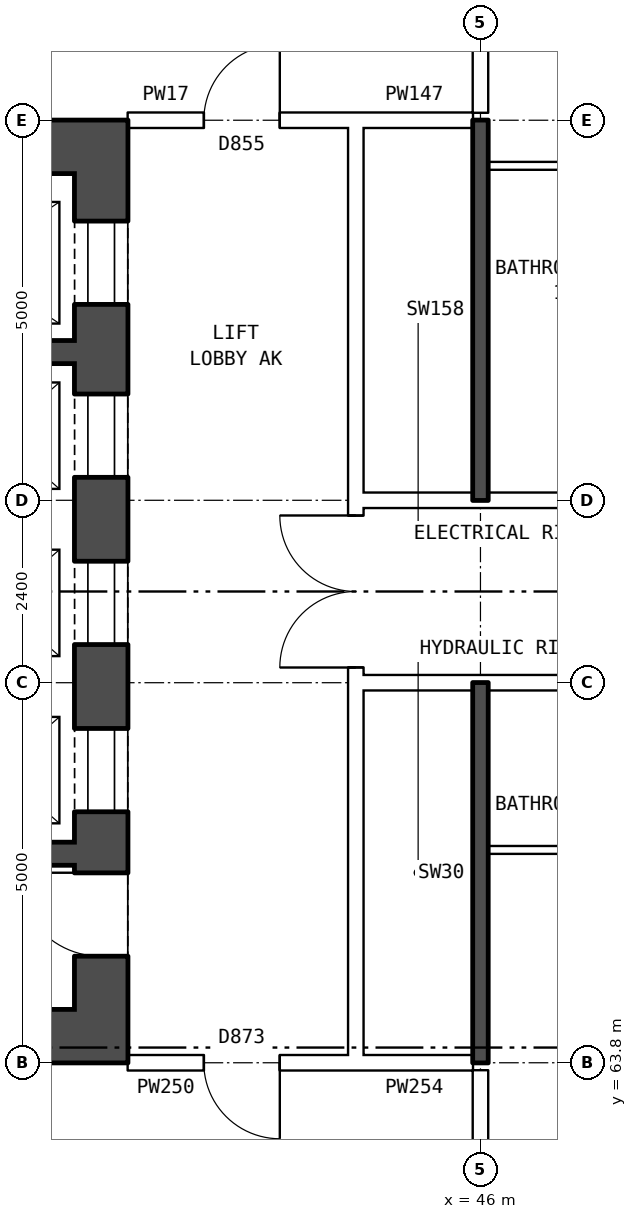
"""IFC4 building model, lengths in metres.
Left out: names, types, materials, properties, quantities, classifications, styles, units other than length and angle.
Written with IfcOpenShell. Run it as: python <this file> out.ifc"""

import sys

from ifc_helpers import new_model, si_unit, direction, frame, frame_2d, origin, place, context, subcontext, project, spatial, rectangle, extrude, element, fill, save


model = new_model("IFC4")
c1 = context("Model", 3, precision=1e-05, world=origin(), true_north=direction((0.0, 1.0)))
c2 = subcontext(c1, "Body", "Model", "MODEL_VIEW")
j1 = project(units=[si_unit("LENGTHUNIT", "METRE"), si_unit("PLANEANGLEUNIT", "RADIAN")], contexts=[c1])
p1 = place(None, origin())
s1 = spatial("IfcSite", under=j1, at=p1, CompositionType="ELEMENT")
p2 = place(p1, origin())
s2 = spatial("IfcBuilding", under=s1, at=p2, CompositionType="ELEMENT")
p3 = place(p2, frame((0.0, 0.0, 71.6)))
s3 = spatial("IfcBuildingStorey", under=s2, at=p3, CompositionType="ELEMENT", Elevation=71.6)
p4 = place(p3, frame((41.01, 75.5, 0.0), z_axis=(0.0, 0.0, 1.0), x_axis=(0.0, -1.0, 0.0)))
e1 = element("IfcWall", 1, at=p4, inside=s3, PredefinedType="SHEAR", context=c2, shape_type="SweptSolid", body=[
    extrude(rectangle(XDim=11.0, YDim=0.7, at=frame_2d((5.5, 0.0))), origin(), (0.0, 0.0, 1.0), 2.85),
])
p5 = place(p4, frame((0.625, 0.0, 0.0)))
e2 = element("IfcOpeningElement", 2, at=p5, cuts=e1, PredefinedType="OPENING", context=c2, shape_type="SweptSolid", body=[
    extrude(rectangle(XDim=1.1, YDim=2.1, at=frame_2d((0.55, 1.05))), frame((0.0, 0.36, 0.0), z_axis=(0.0, -1.0, 0.0), x_axis=(1.0, 0.0, 0.0)), (0.0, 0.0, 1.0), 0.72),
])
p6 = place(p4, frame((2.9, 0.0, 0.0)))
e3 = element("IfcOpeningElement", 3, at=p6, cuts=e1, PredefinedType="OPENING", context=c2, shape_type="SweptSolid", body=[
    extrude(rectangle(XDim=1.1, YDim=2.1, at=frame_2d((0.55, 1.05))), frame((0.0, 0.36, 0.0), z_axis=(0.0, -1.0, 0.0), x_axis=(1.0, 0.0, 0.0)), (0.0, 0.0, 1.0), 0.72),
])
p7 = place(p4, frame((5.1, 0.0, 0.0)))
e4 = element("IfcOpeningElement", 4, at=p7, cuts=e1, PredefinedType="OPENING", context=c2, shape_type="SweptSolid", body=[
    extrude(rectangle(XDim=1.1, YDim=2.1, at=frame_2d((0.55, 1.05))), frame((0.0, 0.36, 0.0), z_axis=(0.0, -1.0, 0.0), x_axis=(1.0, 0.0, 0.0)), (0.0, 0.0, 1.0), 0.72),
])
p8 = place(p4, frame((7.3, 0.0, 0.0)))
e5 = element("IfcOpeningElement", 5, at=p8, cuts=e1, PredefinedType="OPENING", context=c2, shape_type="SweptSolid", body=[
    extrude(rectangle(XDim=1.1, YDim=2.1, at=frame_2d((0.55, 1.05))), frame((0.0, 0.36, 0.0), z_axis=(0.0, -1.0, 0.0), x_axis=(1.0, 0.0, 0.0)), (0.0, 0.0, 1.0), 0.72),
])
p9 = place(p4, frame((9.2, 0.0, 0.0)))
e6 = element("IfcOpeningElement", 6, at=p9, cuts=e1, PredefinedType="OPENING", context=c2, shape_type="SweptSolid", body=[
    extrude(rectangle(XDim=1.1, YDim=2.1, at=frame_2d((0.55, 1.05))), frame((0.0, 0.36, 0.0), z_axis=(0.0, -1.0, 0.0), x_axis=(1.0, 0.0, 0.0)), (0.0, 0.0, 1.0), 0.72),
])
for number, where, z_axis, x_axis in (
    (7, (41.36, 75.85, 0.0), (0.0, 0.0, 1.0), (-1.0, 0.0, 0.0)),
    (8, (41.36, 64.15, 0.0), (0.0, 0.0, 1.0), (-1.0, 0.0, 0.0)),
):
    element("IfcWall", number, at=place(p3, frame(where, z_axis=z_axis, x_axis=x_axis)), inside=s3, PredefinedType="SHEAR", context=c2, shape_type="SweptSolid", body=[
        extrude(rectangle(XDim=9.0, YDim=0.7, at=frame_2d((4.5, 0.0))), origin(), (0.0, 0.0, 1.0), 2.85),
    ])
p10 = place(p3, frame((40.66, 73.15, 0.0), z_axis=(0.0, 0.0, 1.0), x_axis=(-1.0, 0.0, 0.0)))
e9 = element("IfcWall", 9, at=p10, inside=s3, PredefinedType="SHEAR", context=c2, shape_type="SweptSolid", body=[
    extrude(rectangle(XDim=3.32, YDim=0.3, at=frame_2d((1.66, 0.0))), origin(), (0.0, 0.0, 1.0), 2.85),
])
p11 = place(p3, frame((40.66, 66.55, 0.0), z_axis=(0.0, 0.0, 1.0), x_axis=(-1.0, 0.0, 0.0)))
e10 = element("IfcWall", 10, at=p11, inside=s3, PredefinedType="SHEAR", context=c2, shape_type="SweptSolid", body=[
    extrude(rectangle(XDim=2.2, YDim=0.3, at=frame_2d((1.1, 0.0))), origin(), (0.0, 0.0, 1.0), 2.85),
])
p12 = place(p3, frame((44.36, 63.9, 0.0), z_axis=(0.0, 0.0, 1.0), x_axis=(0.0, 1.0, 0.0)))
e11 = element("IfcWall", 11, at=p12, inside=s3, PredefinedType="PARTITIONING", context=c2, shape_type="SweptSolid", body=[
    extrude(rectangle(XDim=12.2, YDim=0.2, at=frame_2d((6.1, 0.0))), origin(), (0.0, 0.0, 1.0), 2.85),
])
p13 = place(p12, frame((5.1, 0.0, 0.0)))
e12 = element("IfcOpeningElement", 12, at=p13, cuts=e11, PredefinedType="OPENING", context=c2, shape_type="SweptSolid", body=[
    extrude(rectangle(XDim=2.0, YDim=2.1, at=frame_2d((1.0, 1.05))), frame((0.0, 0.11, 0.0), z_axis=(0.0, -1.0, 0.0), x_axis=(1.0, 0.0, 0.0)), (0.0, 0.0, 1.0), 0.22),
])
p14 = place(p3, frame((41.36, 63.8, 0.0), z_axis=(0.0, 0.0, 1.0), x_axis=(1.0, 0.0, 0.0)))
e13 = element("IfcWall", 13, at=p14, inside=s3, PredefinedType="PARTITIONING", context=c2, shape_type="SweptSolid", body=[
    extrude(rectangle(XDim=3.0, YDim=0.2, at=frame_2d((1.5, 0.0))), origin(), (0.0, 0.0, 1.0), 2.85),
])
p15 = place(p14, frame((1.0, 0.0, 0.0)))
e14 = element("IfcOpeningElement", 14, at=p15, cuts=e13, PredefinedType="OPENING", context=c2, shape_type="SweptSolid", body=[
    extrude(rectangle(XDim=1.0, YDim=2.1, at=frame_2d((0.5, 1.05))), frame((0.0, 0.11, 0.0), z_axis=(0.0, -1.0, 0.0), x_axis=(1.0, 0.0, 0.0)), (0.0, 0.0, 1.0), 0.22),
])
p16 = place(p3, frame((44.36, 63.8, 0.0), z_axis=(0.0, 0.0, 1.0), x_axis=(1.0, 0.0, 0.0)))
e15 = element("IfcWall", 15, at=p16, inside=s3, PredefinedType="PARTITIONING", context=c2, shape_type="SweptSolid", body=[
    extrude(rectangle(XDim=1.54, YDim=0.2, at=frame_2d((0.77, 0.0))), origin(), (0.0, 0.0, 1.0), 2.85),
])
p17 = place(p3, frame((46.1, 66.6, 0.0), z_axis=(0.0, 0.0, 1.0), x_axis=(1.0, 0.0, 0.0)))
e16 = element("IfcWall", 16, at=p17, inside=s3, PredefinedType="PARTITIONING", context=c2, shape_type="SweptSolid", body=[
    extrude(rectangle(XDim=2.9, YDim=0.1, at=frame_2d((1.45, 0.0))), origin(), (0.0, 0.0, 1.0), 2.85),
])
p18 = place(p3, frame((44.36, 68.8, 0.0), z_axis=(0.0, 0.0, 1.0), x_axis=(1.0, 0.0, 0.0)))
e17 = element("IfcWall", 17, at=p18, inside=s3, PredefinedType="PARTITIONING", context=c2, shape_type="SweptSolid", body=[
    extrude(rectangle(XDim=19.28, YDim=0.2, at=frame_2d((9.64, 0.0))), origin(), (0.0, 0.0, 1.0), 2.85),
])
p19 = place(p18, frame((14.64, 0.0, 0.0)))
e18 = element("IfcOpeningElement", 18, at=p19, cuts=e17, PredefinedType="OPENING", context=c2, shape_type="SweptSolid", body=[
    extrude(rectangle(XDim=1.0, YDim=2.1, at=frame_2d((0.5, 1.05))), frame((0.0, 0.11, 0.0), z_axis=(0.0, -1.0, 0.0), x_axis=(1.0, 0.0, 0.0)), (0.0, 0.0, 1.0), 0.22),
])
p20 = place(p18, frame((5.64, 0.0, 0.0)))
e19 = element("IfcOpeningElement", 19, at=p20, cuts=e17, PredefinedType="OPENING", context=c2, shape_type="SweptSolid", body=[
    extrude(rectangle(XDim=1.0, YDim=2.1, at=frame_2d((0.5, 1.05))), frame((0.0, 0.11, 0.0), z_axis=(0.0, -1.0, 0.0), x_axis=(1.0, 0.0, 0.0)), (0.0, 0.0, 1.0), 0.22),
])
p21 = place(p3, frame((44.36, 71.2, 0.0), z_axis=(0.0, 0.0, 1.0), x_axis=(1.0, 0.0, 0.0)))
e20 = element("IfcWall", 20, at=p21, inside=s3, PredefinedType="PARTITIONING", context=c2, shape_type="SweptSolid", body=[
    extrude(rectangle(XDim=19.28, YDim=0.2, at=frame_2d((9.64, 0.0))), origin(), (0.0, 0.0, 1.0), 2.85),
])
p22 = place(p21, frame((14.64, 0.0, 0.0)))
e21 = element("IfcOpeningElement", 21, at=p22, cuts=e20, PredefinedType="OPENING", context=c2, shape_type="SweptSolid", body=[
    extrude(rectangle(XDim=1.0, YDim=2.1, at=frame_2d((0.5, 1.05))), frame((0.0, 0.11, 0.0), z_axis=(0.0, -1.0, 0.0), x_axis=(1.0, 0.0, 0.0)), (0.0, 0.0, 1.0), 0.22),
])
p23 = place(p21, frame((5.64, 0.0, 0.0)))
e22 = element("IfcOpeningElement", 22, at=p23, cuts=e20, PredefinedType="OPENING", context=c2, shape_type="SweptSolid", body=[
    extrude(rectangle(XDim=1.0, YDim=2.1, at=frame_2d((0.5, 1.05))), frame((0.0, 0.11, 0.0), z_axis=(0.0, -1.0, 0.0), x_axis=(1.0, 0.0, 0.0)), (0.0, 0.0, 1.0), 0.22),
])
p24 = place(p3, frame((46.1, 75.6, 0.0), z_axis=(0.0, 0.0, 1.0), x_axis=(1.0, 0.0, 0.0)))
e23 = element("IfcWall", 23, at=p24, inside=s3, PredefinedType="PARTITIONING", context=c2, shape_type="SweptSolid", body=[
    extrude(rectangle(XDim=2.9, YDim=0.1, at=frame_2d((1.45, 0.0))), origin(), (0.0, 0.0, 1.0), 2.85),
])
p25 = place(p3, frame((41.36, 76.2, 0.0), z_axis=(0.0, 0.0, 1.0), x_axis=(1.0, 0.0, 0.0)))
e24 = element("IfcWall", 24, at=p25, inside=s3, PredefinedType="PARTITIONING", context=c2, shape_type="SweptSolid", body=[
    extrude(rectangle(XDim=3.0, YDim=0.2, at=frame_2d((1.5, 0.0))), origin(), (0.0, 0.0, 1.0), 2.85),
])
p26 = place(p25, frame((1.0, 0.0, 0.0)))
e25 = element("IfcOpeningElement", 25, at=p26, cuts=e24, PredefinedType="OPENING", context=c2, shape_type="SweptSolid", body=[
    extrude(rectangle(XDim=1.0, YDim=2.1, at=frame_2d((0.5, 1.05))), frame((0.0, 0.11, 0.0), z_axis=(0.0, -1.0, 0.0), x_axis=(1.0, 0.0, 0.0)), (0.0, 0.0, 1.0), 0.22),
])
p27 = place(p3, frame((44.36, 76.2, 0.0), z_axis=(0.0, 0.0, 1.0), x_axis=(1.0, 0.0, 0.0)))
e26 = element("IfcWall", 26, at=p27, inside=s3, PredefinedType="PARTITIONING", context=c2, shape_type="SweptSolid", body=[
    extrude(rectangle(XDim=1.54, YDim=0.2, at=frame_2d((0.77, 0.0))), origin(), (0.0, 0.0, 1.0), 2.85),
])
p28 = place(p3, frame((46.0, 61.5, 0.0), z_axis=(0.0, 0.0, 1.0), x_axis=(0.0, 1.0, 0.0)))
e27 = element("IfcWall", 27, at=p28, inside=s3, PredefinedType="PARTITIONING", context=c2, shape_type="SweptSolid", body=[
    extrude(rectangle(XDim=2.2, YDim=0.2, at=frame_2d((1.1, 0.0))), origin(), (0.0, 0.0, 1.0), 2.85),
])
for number, where, z_axis, x_axis in (
    (28, (46.0, 63.8, 0.0), (0.0, 0.0, 1.0), (0.0, 1.0, 0.0)),
    (29, (46.0, 71.2, 0.0), (0.0, 0.0, 1.0), (0.0, 1.0, 0.0)),
):
    element("IfcWall", number, at=place(p3, frame(where, z_axis=z_axis, x_axis=x_axis)), inside=s3, PredefinedType="SOLIDWALL", context=c2, shape_type="SweptSolid", body=[
        extrude(rectangle(XDim=5.0, YDim=0.2, at=frame_2d((2.5, 0.0))), origin(), (0.0, 0.0, 1.0), 2.85),
    ])
p29 = place(p3, frame((46.0, 76.3, 0.0), z_axis=(0.0, 0.0, 1.0), x_axis=(0.0, 1.0, 0.0)))
e30 = element("IfcWall", 30, at=p29, inside=s3, PredefinedType="PARTITIONING", context=c2, shape_type="SweptSolid", body=[
    extrude(rectangle(XDim=2.2, YDim=0.2, at=frame_2d((1.1, 0.0))), origin(), (0.0, 0.0, 1.0), 2.85),
])
p30 = place(p5, origin())
e31 = element("IfcDoor", 31, at=p30, inside=s3, OperationType="DOUBLE_DOOR_SLIDING", PredefinedType="DOOR", context=c2, shape_type="SweptSolid", body=[
    extrude(rectangle(XDim=1.1, YDim=2.1, at=frame_2d((0.55, 1.05))), frame((0.0, -0.285, 0.0), z_axis=(0.0, -1.0, 0.0), x_axis=(1.0, 0.0, 0.0)), (0.0, 0.0, 1.0), 0.05),
])
fill(e2, e31)
p31 = place(p6, origin())
e32 = element("IfcDoor", 32, at=p31, inside=s3, OperationType="DOUBLE_DOOR_SLIDING", PredefinedType="DOOR", context=c2, shape_type="SweptSolid", body=[
    extrude(rectangle(XDim=1.1, YDim=2.1, at=frame_2d((0.55, 1.05))), frame((0.0, -0.285, 0.0), z_axis=(0.0, -1.0, 0.0), x_axis=(1.0, 0.0, 0.0)), (0.0, 0.0, 1.0), 0.05),
])
fill(e3, e32)
p32 = place(p7, origin())
e33 = element("IfcDoor", 33, at=p32, inside=s3, OperationType="DOUBLE_DOOR_SLIDING", PredefinedType="DOOR", context=c2, shape_type="SweptSolid", body=[
    extrude(rectangle(XDim=1.1, YDim=2.1, at=frame_2d((0.55, 1.05))), frame((0.0, -0.285, 0.0), z_axis=(0.0, -1.0, 0.0), x_axis=(1.0, 0.0, 0.0)), (0.0, 0.0, 1.0), 0.05),
])
fill(e4, e33)
p33 = place(p8, origin())
e34 = element("IfcDoor", 34, at=p33, inside=s3, OperationType="DOUBLE_DOOR_SLIDING", PredefinedType="DOOR", context=c2, shape_type="SweptSolid", body=[
    extrude(rectangle(XDim=1.1, YDim=2.1, at=frame_2d((0.55, 1.05))), frame((0.0, -0.285, 0.0), z_axis=(0.0, -1.0, 0.0), x_axis=(1.0, 0.0, 0.0)), (0.0, 0.0, 1.0), 0.05),
])
fill(e5, e34)
p34 = place(p9, frame((1.1, 0.0, 0.0), z_axis=(0.0, 0.0, 1.0), x_axis=(-1.0, 0.0, 0.0)))
e35 = element("IfcDoor", 35, at=p34, inside=s3, OperationType="SINGLE_SWING_RIGHT", PredefinedType="DOOR", context=c2, shape_type="SweptSolid", body=[
    extrude(rectangle(XDim=1.1, YDim=2.1, at=frame_2d((0.55, 1.05))), frame((0.0, 0.335, 0.0), z_axis=(0.0, -1.0, 0.0), x_axis=(1.0, 0.0, 0.0)), (0.0, 0.0, 1.0), 0.05),
])
fill(e6, e35)
p35 = place(p13, origin())
e36 = element("IfcDoor", 36, at=p35, inside=s3, OperationType="DOUBLE_DOOR_SINGLE_SWING", PredefinedType="DOOR", context=c2, shape_type="SweptSolid", body=[
    extrude(rectangle(XDim=2.0, YDim=2.1, at=frame_2d((1.0, 1.05))), frame((0.0, 0.025, 0.0), z_axis=(0.0, -1.0, 0.0), x_axis=(1.0, 0.0, 0.0)), (0.0, 0.0, 1.0), 0.05),
])
fill(e12, e36)
p36 = place(p15, frame((1.0, 0.0, 0.0), z_axis=(0.0, 0.0, 1.0), x_axis=(-1.0, 0.0, 0.0)))
e37 = element("IfcDoor", 37, at=p36, inside=s3, OperationType="SINGLE_SWING_LEFT", PredefinedType="DOOR", context=c2, shape_type="SweptSolid", body=[
    extrude(rectangle(XDim=1.0, YDim=2.1, at=frame_2d((0.5, 1.05))), frame((0.0, 0.025, 0.0), z_axis=(0.0, -1.0, 0.0), x_axis=(1.0, 0.0, 0.0)), (0.0, 0.0, 1.0), 0.05),
])
fill(e14, e37)
p37 = place(p26, origin())
e38 = element("IfcDoor", 38, at=p37, inside=s3, OperationType="SINGLE_SWING_RIGHT", PredefinedType="DOOR", context=c2, shape_type="SweptSolid", body=[
    extrude(rectangle(XDim=1.0, YDim=2.1, at=frame_2d((0.5, 1.05))), frame((0.0, 0.025, 0.0), z_axis=(0.0, -1.0, 0.0), x_axis=(1.0, 0.0, 0.0)), (0.0, 0.0, 1.0), 0.05),
])
fill(e25, e38)
save(model, sys.argv[1])
